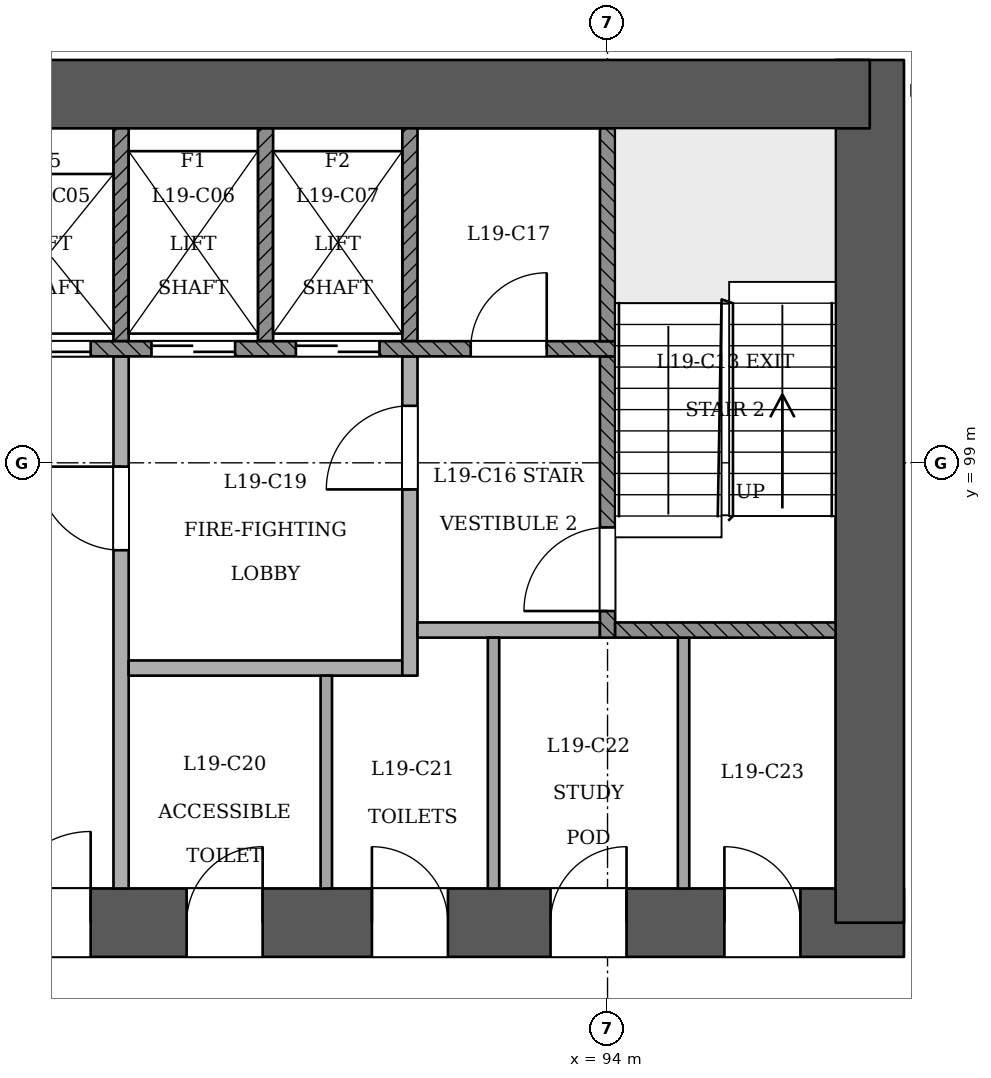
"""IFC4 building model, lengths in metres.
Left out: names, types, materials, properties, quantities, classifications, styles, units other than length and angle.
Written with IfcOpenShell. Run it as: python <this file> out.ifc"""

import sys

from ifc_helpers import new_model, si_unit, direction, frame, frame_2d, origin, place, context, subcontext, project, spatial, rectangle, extrude, element, fill, save


model = new_model("IFC4")
c1 = context("Model", 3, precision=1e-05, world=origin(), true_north=direction((0.0, 1.0)))
c2 = subcontext(c1, "Body", "Model", "MODEL_VIEW")
j1 = project(units=[si_unit("LENGTHUNIT", "METRE"), si_unit("PLANEANGLEUNIT", "RADIAN")], contexts=[c1])
p1 = place(None, origin())
s1 = spatial("IfcSite", under=j1, at=p1, CompositionType="ELEMENT")
p2 = place(p1, origin())
s2 = spatial("IfcBuilding", under=s1, at=p2, CompositionType="ELEMENT")
p3 = place(p2, frame((0.0, 0.0, 77.4)))
s3 = spatial("IfcBuildingStorey", under=s2, at=p3, CompositionType="ELEMENT", Elevation=77.4)
p4 = place(p3, frame((72.55, 92.95, 0.0), z_axis=(0.0, 0.0, 1.0), x_axis=(1.0, 0.0, 0.0)))
e1 = element("IfcWall", 1, at=p4, inside=s3, PredefinedType="SHEAR", context=c2, shape_type="SweptSolid", body=[
    extrude(rectangle(XDim=25.35, YDim=0.9, at=frame_2d((12.675, 0.0))), origin(), (0.0, 0.0, 1.0), 3.6),
])
p5 = place(p4, frame((1.25, 0.0, 0.0)))
e2 = element("IfcOpeningElement", 2, at=p5, cuts=e1, PredefinedType="OPENING", context=c2, shape_type="SweptSolid", body=[
    extrude(rectangle(XDim=1.2, YDim=2.1, at=frame_2d((0.6, 1.05))), frame((0.0, 0.46, 0.0), z_axis=(0.0, -1.0, 0.0), x_axis=(1.0, 0.0, 0.0)), (0.0, 0.0, 1.0), 0.921),
])
p6 = place(p4, frame((3.45, 0.0, 0.0)))
e3 = element("IfcOpeningElement", 3, at=p6, cuts=e1, PredefinedType="OPENING", context=c2, shape_type="SweptSolid", body=[
    extrude(rectangle(XDim=1.2, YDim=2.1, at=frame_2d((0.6, 1.05))), frame((0.0, 0.46, 0.0), z_axis=(0.0, -1.0, 0.0), x_axis=(1.0, 0.0, 0.0)), (0.0, 0.0, 1.0), 0.921),
])
p7 = place(p4, frame((13.45, 0.0, 0.0)))
e4 = element("IfcOpeningElement", 4, at=p7, cuts=e1, PredefinedType="OPENING", context=c2, shape_type="SweptSolid", body=[
    extrude(rectangle(XDim=1.2, YDim=2.1, at=frame_2d((0.6, 1.05))), frame((0.0, 0.46, 0.0), z_axis=(0.0, -1.0, 0.0), x_axis=(1.0, 0.0, 0.0)), (0.0, 0.0, 1.0), 0.921),
])
p8 = place(p4, frame((15.913, 0.0, 0.0)))
e5 = element("IfcOpeningElement", 5, at=p8, cuts=e1, PredefinedType="OPENING", context=c2, shape_type="SweptSolid", body=[
    extrude(rectangle(XDim=1.0, YDim=2.1, at=frame_2d((0.5, 1.05))), frame((0.0, 0.46, 0.0), z_axis=(0.0, -1.0, 0.0), x_axis=(1.0, 0.0, 0.0)), (0.0, 0.0, 1.0), 0.921),
])
p9 = place(p4, frame((18.35, 0.0, 0.0)))
e6 = element("IfcOpeningElement", 6, at=p9, cuts=e1, PredefinedType="OPENING", context=c2, shape_type="SweptSolid", body=[
    extrude(rectangle(XDim=1.0, YDim=2.1, at=frame_2d((0.5, 1.05))), frame((0.0, 0.46, 0.0), z_axis=(0.0, -1.0, 0.0), x_axis=(1.0, 0.0, 0.0)), (0.0, 0.0, 1.0), 0.921),
])
p10 = place(p4, frame((20.7, 0.0, 0.0)))
e7 = element("IfcOpeningElement", 7, at=p10, cuts=e1, PredefinedType="OPENING", context=c2, shape_type="SweptSolid", body=[
    extrude(rectangle(XDim=1.0, YDim=2.1, at=frame_2d((0.5, 1.05))), frame((0.0, 0.46, 0.0), z_axis=(0.0, -1.0, 0.0), x_axis=(1.0, 0.0, 0.0)), (0.0, 0.0, 1.0), 0.921),
])
p11 = place(p4, frame((22.988, 0.0, 0.0)))
e8 = element("IfcOpeningElement", 8, at=p11, cuts=e1, PredefinedType="OPENING", context=c2, shape_type="SweptSolid", body=[
    extrude(rectangle(XDim=1.0, YDim=2.1, at=frame_2d((0.5, 1.05))), frame((0.0, 0.46, 0.0), z_axis=(0.0, -1.0, 0.0), x_axis=(1.0, 0.0, 0.0)), (0.0, 0.0, 1.0), 0.921),
])
p12 = place(p3, frame((97.45, 92.95, 0.0), z_axis=(0.0, 0.0, 1.0), x_axis=(0.0, 1.0, 0.0)))
e9 = element("IfcWall", 9, at=p12, inside=s3, PredefinedType="SHEAR", context=c2, shape_type="SweptSolid", body=[
    extrude(rectangle(XDim=11.35, YDim=0.9, at=frame_2d((5.675, 0.0))), origin(), (0.0, 0.0, 1.0), 3.6),
])
p13 = place(p3, frame((97.45, 103.85, 0.0), z_axis=(0.0, 0.0, 1.0), x_axis=(-1.0, 0.0, 0.0)))
e10 = element("IfcWall", 10, at=p13, inside=s3, PredefinedType="SHEAR", context=c2, shape_type="SweptSolid", body=[
    extrude(rectangle(XDim=25.35, YDim=0.9, at=frame_2d((12.675, 0.0))), origin(), (0.0, 0.0, 1.0), 3.6),
])
p14 = place(p3, frame((85.708, 60.106, 0.0), z_axis=(0.0, 0.0, 1.0), x_axis=(0.500000789788, 0.8660249478, 0.0)))
e11 = element("IfcWall", 11, at=p14, inside=s3, PredefinedType="PARTITIONING", context=c2, shape_type="SweptSolid", body=[
    extrude(rectangle(XDim=42.368, YDim=0.15, at=frame_2d((21.184, 0.0))), origin(), (0.0, 0.0, 1.0), 2.7),
])
p15 = place(p14, frame((0.233, 0.0, 0.0)))
e12 = element("IfcOpeningElement", 12, at=p15, cuts=e11, PredefinedType="OPENING", context=c2, shape_type="SweptSolid", body=[
    extrude(rectangle(XDim=1.2, YDim=2.1, at=frame_2d((0.6, 1.05))), frame((0.0, 0.085, 0.0), z_axis=(0.0, -1.0, 0.0), x_axis=(1.0, 0.0, 0.0)), (0.0, 0.0, 1.0), 0.171),
])
p16 = place(p14, frame((4.063, 0.0, 0.0)))
e13 = element("IfcOpeningElement", 13, at=p16, cuts=e11, PredefinedType="OPENING", context=c2, shape_type="SweptSolid", body=[
    extrude(rectangle(XDim=1.0, YDim=2.1, at=frame_2d((0.5, 1.05))), frame((0.0, 0.085, 0.0), z_axis=(0.0, -1.0, 0.0), x_axis=(1.0, 0.0, 0.0)), (0.0, 0.0, 1.0), 0.171),
])
p17 = place(p14, frame((10.738, 0.0, 0.0)))
e14 = element("IfcOpeningElement", 14, at=p17, cuts=e11, PredefinedType="OPENING", context=c2, shape_type="SweptSolid", body=[
    extrude(rectangle(XDim=1.0, YDim=2.1, at=frame_2d((0.5, 1.05))), frame((0.0, 0.085, 0.0), z_axis=(0.0, -1.0, 0.0), x_axis=(1.0, 0.0, 0.0)), (0.0, 0.0, 1.0), 0.171),
])
p18 = place(p14, frame((13.179, 0.0, 0.0)))
e15 = element("IfcOpeningElement", 15, at=p18, cuts=e11, PredefinedType="OPENING", context=c2, shape_type="SweptSolid", body=[
    extrude(rectangle(XDim=1.0, YDim=2.1, at=frame_2d((0.5, 1.05))), frame((0.0, 0.085, 0.0), z_axis=(0.0, -1.0, 0.0), x_axis=(1.0, 0.0, 0.0)), (0.0, 0.0, 1.0), 0.171),
])
p19 = place(p14, frame((20.858, 0.0, 0.0)))
e16 = element("IfcOpeningElement", 16, at=p19, cuts=e11, PredefinedType="OPENING", context=c2, shape_type="SweptSolid", body=[
    extrude(rectangle(XDim=1.2, YDim=2.1, at=frame_2d((0.6, 1.05))), frame((0.0, 0.085, 0.0), z_axis=(0.0, -1.0, 0.0), x_axis=(1.0, 0.0, 0.0)), (0.0, 0.0, 1.0), 0.171),
])
p20 = place(p14, frame((28.738, 0.0, 0.0)))
e17 = element("IfcOpeningElement", 17, at=p20, cuts=e11, PredefinedType="OPENING", context=c2, shape_type="SweptSolid", body=[
    extrude(rectangle(XDim=1.0, YDim=2.1, at=frame_2d((0.5, 1.05))), frame((0.0, 0.085, 0.0), z_axis=(0.0, -1.0, 0.0), x_axis=(1.0, 0.0, 0.0)), (0.0, 0.0, 1.0), 0.171),
])
p21 = place(p14, frame((31.029, 0.0, 0.0)))
e18 = element("IfcOpeningElement", 18, at=p21, cuts=e11, PredefinedType="OPENING", context=c2, shape_type="SweptSolid", body=[
    extrude(rectangle(XDim=1.1, YDim=2.1, at=frame_2d((0.55, 1.05))), frame((0.0, 0.085, 0.0), z_axis=(0.0, -1.0, 0.0), x_axis=(1.0, 0.0, 0.0)), (0.0, 0.0, 1.0), 0.171),
])
p22 = place(p14, frame((38.401, 0.0, 0.0)))
e19 = element("IfcOpeningElement", 19, at=p22, cuts=e11, PredefinedType="OPENING", context=c2, shape_type="SweptSolid", body=[
    extrude(rectangle(XDim=1.2, YDim=2.1, at=frame_2d((0.6, 1.05))), frame((0.0, 0.085, 0.0), z_axis=(0.0, -1.0, 0.0), x_axis=(1.0, 0.0, 0.0)), (0.0, 0.0, 1.0), 0.171),
])
p23 = place(p3, frame((87.6, 93.4, 0.0), z_axis=(0.0, 0.0, 1.0), x_axis=(0.0, 1.0, 0.0)))
e20 = element("IfcWall", 20, at=p23, inside=s3, PredefinedType="PARTITIONING", context=c2, shape_type="SweptSolid", body=[
    extrude(rectangle(XDim=7.0, YDim=0.2, at=frame_2d((3.5, 0.0))), origin(), (0.0, 0.0, 1.0), 3.1),
])
p24 = place(p23, frame((4.45, 0.0, 0.0)))
e21 = element("IfcOpeningElement", 21, at=p24, cuts=e20, PredefinedType="OPENING", context=c2, shape_type="SweptSolid", body=[
    extrude(rectangle(XDim=1.1, YDim=2.1, at=frame_2d((0.55, 1.05))), frame((0.0, 0.11, 0.0), z_axis=(0.0, -1.0, 0.0), x_axis=(1.0, 0.0, 0.0)), (0.0, 0.0, 1.0), 0.221),
])
p25 = place(p3, frame((90.3, 93.4, 0.0), z_axis=(0.0, 0.0, 1.0), x_axis=(0.0, 1.0, 0.0)))
e22 = element("IfcWall", 22, at=p25, inside=s3, PredefinedType="PARTITIONING", context=c2, shape_type="SweptSolid", body=[
    extrude(rectangle(XDim=2.8, YDim=0.15, at=frame_2d((1.4, 0.0))), origin(), (0.0, 0.0, 1.0), 3.1),
])
for number, where, z_axis, x_axis in (
    (23, (92.5, 93.4, 0.0), (0.0, 0.0, 1.0), (0.0, 1.0, 0.0)),
    (24, (95.0, 93.4, 0.0), (0.0, 0.0, 1.0), (0.0, 1.0, 0.0)),
):
    element("IfcWall", number, at=place(p3, frame(where, z_axis=z_axis, x_axis=x_axis)), inside=s3, PredefinedType="PARTITIONING", context=c2, shape_type="SweptSolid", body=[
        extrude(rectangle(XDim=3.3, YDim=0.15, at=frame_2d((1.65, 0.0))), origin(), (0.0, 0.0, 1.0), 3.1),
    ])
p26 = place(p3, frame((87.7, 96.3, 0.0), z_axis=(0.0, 0.0, 1.0), x_axis=(1.0, 0.0, 0.0)))
e25 = element("IfcWall", 25, at=p26, inside=s3, PredefinedType="PARTITIONING", context=c2, shape_type="SweptSolid", body=[
    extrude(rectangle(XDim=3.6, YDim=0.2, at=frame_2d((1.8, 0.0))), origin(), (0.0, 0.0, 1.0), 3.1),
])
p27 = place(p3, frame((91.4, 96.2, 0.0), z_axis=(0.0, 0.0, 1.0), x_axis=(0.0, 1.0, 0.0)))
e26 = element("IfcWall", 26, at=p27, inside=s3, PredefinedType="PARTITIONING", context=c2, shape_type="SweptSolid", body=[
    extrude(rectangle(XDim=4.2, YDim=0.2, at=frame_2d((2.1, 0.0))), origin(), (0.0, 0.0, 1.0), 3.1),
])
p28 = place(p27, frame((2.45, 0.0, 0.0)))
e27 = element("IfcOpeningElement", 27, at=p28, cuts=e26, PredefinedType="OPENING", context=c2, shape_type="SweptSolid", body=[
    extrude(rectangle(XDim=1.1, YDim=2.1, at=frame_2d((0.55, 1.05))), frame((0.0, 0.11, 0.0), z_axis=(0.0, -1.0, 0.0), x_axis=(1.0, 0.0, 0.0)), (0.0, 0.0, 1.0), 0.221),
])
p29 = place(p3, frame((91.5, 96.8, 0.0), z_axis=(0.0, 0.0, 1.0), x_axis=(1.0, 0.0, 0.0)))
e28 = element("IfcWall", 28, at=p29, inside=s3, PredefinedType="PARTITIONING", context=c2, shape_type="SweptSolid", body=[
    extrude(rectangle(XDim=2.4, YDim=0.2, at=frame_2d((1.2, 0.0))), origin(), (0.0, 0.0, 1.0), 3.1),
])
p30 = place(p3, frame((94.0, 96.7, 0.0), z_axis=(0.0, 0.0, 1.0), x_axis=(0.0, 1.0, 0.0)))
e29 = element("IfcWall", 29, at=p30, inside=s3, PredefinedType="SOLIDWALL", context=c2, shape_type="SweptSolid", body=[
    extrude(rectangle(XDim=3.7, YDim=0.2, at=frame_2d((1.85, 0.0))), origin(), (0.0, 0.0, 1.0), 3.1),
])
p31 = place(p30, frame((0.35, 0.0, 0.0)))
e30 = element("IfcOpeningElement", 30, at=p31, cuts=e29, PredefinedType="OPENING", context=c2, shape_type="SweptSolid", body=[
    extrude(rectangle(XDim=1.1, YDim=2.1, at=frame_2d((0.55, 1.05))), frame((0.0, 0.11, 0.0), z_axis=(0.0, -1.0, 0.0), x_axis=(1.0, 0.0, 0.0)), (0.0, 0.0, 1.0), 0.221),
])
p32 = place(p3, frame((94.1, 96.8, 0.0), z_axis=(0.0, 0.0, 1.0), x_axis=(1.0, 0.0, 0.0)))
e31 = element("IfcWall", 31, at=p32, inside=s3, PredefinedType="SOLIDWALL", context=c2, shape_type="SweptSolid", body=[
    extrude(rectangle(XDim=2.9, YDim=0.2, at=frame_2d((1.45, 0.0))), origin(), (0.0, 0.0, 1.0), 3.1),
])
p33 = place(p3, frame((75.9, 100.5, 0.0), z_axis=(0.0, 0.0, 1.0), x_axis=(1.0, 0.0, 0.0)))
e32 = element("IfcWall", 32, at=p33, inside=s3, PredefinedType="SOLIDWALL", context=c2, shape_type="SweptSolid", body=[
    extrude(rectangle(XDim=18.2, YDim=0.2, at=frame_2d((9.1, 0.0))), origin(), (0.0, 0.0, 1.0), 3.1),
])
p34 = place(p33, frame((2.6, 0.0, 0.0)))
e33 = element("IfcOpeningElement", 33, at=p34, cuts=e32, PredefinedType="OPENING", context=c2, shape_type="SweptSolid", body=[
    extrude(rectangle(XDim=1.1, YDim=2.1, at=frame_2d((0.55, 1.05))), frame((0.0, 0.11, 0.0), z_axis=(0.0, -1.0, 0.0), x_axis=(1.0, 0.0, 0.0)), (0.0, 0.0, 1.0), 0.221),
])
p35 = place(p33, frame((4.5, 0.0, 0.0)))
e34 = element("IfcOpeningElement", 34, at=p35, cuts=e32, PredefinedType="OPENING", context=c2, shape_type="SweptSolid", body=[
    extrude(rectangle(XDim=1.1, YDim=2.1, at=frame_2d((0.55, 1.05))), frame((0.0, 0.11, 0.0), z_axis=(0.0, -1.0, 0.0), x_axis=(1.0, 0.0, 0.0)), (0.0, 0.0, 1.0), 0.221),
])
p36 = place(p33, frame((6.4, 0.0, 0.0)))
e35 = element("IfcOpeningElement", 35, at=p36, cuts=e32, PredefinedType="OPENING", context=c2, shape_type="SweptSolid", body=[
    extrude(rectangle(XDim=1.1, YDim=2.1, at=frame_2d((0.55, 1.05))), frame((0.0, 0.11, 0.0), z_axis=(0.0, -1.0, 0.0), x_axis=(1.0, 0.0, 0.0)), (0.0, 0.0, 1.0), 0.221),
])
p37 = place(p33, frame((8.3, 0.0, 0.0)))
e36 = element("IfcOpeningElement", 36, at=p37, cuts=e32, PredefinedType="OPENING", context=c2, shape_type="SweptSolid", body=[
    extrude(rectangle(XDim=1.1, YDim=2.1, at=frame_2d((0.55, 1.05))), frame((0.0, 0.11, 0.0), z_axis=(0.0, -1.0, 0.0), x_axis=(1.0, 0.0, 0.0)), (0.0, 0.0, 1.0), 0.221),
])
p38 = place(p33, frame((10.2, 0.0, 0.0)))
e37 = element("IfcOpeningElement", 37, at=p38, cuts=e32, PredefinedType="OPENING", context=c2, shape_type="SweptSolid", body=[
    extrude(rectangle(XDim=1.1, YDim=2.1, at=frame_2d((0.55, 1.05))), frame((0.0, 0.11, 0.0), z_axis=(0.0, -1.0, 0.0), x_axis=(1.0, 0.0, 0.0)), (0.0, 0.0, 1.0), 0.221),
])
p39 = place(p33, frame((12.1, 0.0, 0.0)))
e38 = element("IfcOpeningElement", 38, at=p39, cuts=e32, PredefinedType="OPENING", context=c2, shape_type="SweptSolid", body=[
    extrude(rectangle(XDim=1.1, YDim=2.1, at=frame_2d((0.55, 1.05))), frame((0.0, 0.11, 0.0), z_axis=(0.0, -1.0, 0.0), x_axis=(1.0, 0.0, 0.0)), (0.0, 0.0, 1.0), 0.221),
])
p40 = place(p33, frame((14.0, 0.0, 0.0)))
e39 = element("IfcOpeningElement", 39, at=p40, cuts=e32, PredefinedType="OPENING", context=c2, shape_type="SweptSolid", body=[
    extrude(rectangle(XDim=1.1, YDim=2.1, at=frame_2d((0.55, 1.05))), frame((0.0, 0.11, 0.0), z_axis=(0.0, -1.0, 0.0), x_axis=(1.0, 0.0, 0.0)), (0.0, 0.0, 1.0), 0.221),
])
p41 = place(p33, frame((0.65, 0.0, 0.0)))
e40 = element("IfcOpeningElement", 40, at=p41, cuts=e32, PredefinedType="OPENING", context=c2, shape_type="SweptSolid", body=[
    extrude(rectangle(XDim=1.0, YDim=2.1, at=frame_2d((0.5, 1.05))), frame((0.0, 0.11, 0.0), z_axis=(0.0, -1.0, 0.0), x_axis=(1.0, 0.0, 0.0)), (0.0, 0.0, 1.0), 0.221),
])
p42 = place(p33, frame((16.3, 0.0, 0.0)))
e41 = element("IfcOpeningElement", 41, at=p42, cuts=e32, PredefinedType="OPENING", context=c2, shape_type="SweptSolid", body=[
    extrude(rectangle(XDim=1.0, YDim=2.1, at=frame_2d((0.5, 1.05))), frame((0.0, 0.11, 0.0), z_axis=(0.0, -1.0, 0.0), x_axis=(1.0, 0.0, 0.0)), (0.0, 0.0, 1.0), 0.221),
])
for number, where, z_axis, x_axis in (
    (42, (87.6, 100.6, 0.0), (0.0, 0.0, 1.0), (0.0, 1.0, 0.0)),
    (43, (89.5, 100.6, 0.0), (0.0, 0.0, 1.0), (0.0, 1.0, 0.0)),
    (44, (91.4, 100.6, 0.0), (0.0, 0.0, 1.0), (0.0, 1.0, 0.0)),
    (45, (94.0, 100.6, 0.0), (0.0, 0.0, 1.0), (0.0, 1.0, 0.0)),
):
    element("IfcWall", number, at=place(p3, frame(where, z_axis=z_axis, x_axis=x_axis)), inside=s3, PredefinedType="SOLIDWALL", context=c2, shape_type="SweptSolid", body=[
        extrude(rectangle(XDim=2.8, YDim=0.2, at=frame_2d((1.4, 0.0))), origin(), (0.0, 0.0, 1.0), 3.1),
    ])
p43 = place(p38, origin())
e46 = element("IfcDoor", 46, at=p43, inside=s3, OperationType="SLIDING_TO_RIGHT", PredefinedType="NOTDEFINED", context=c2, shape_type="SweptSolid", body=[
    extrude(rectangle(XDim=1.1, YDim=2.1, at=frame_2d((0.55, 1.05))), frame((0.0, 0.025, 0.0), z_axis=(0.0, -1.0, 0.0), x_axis=(1.0, 0.0, 0.0)), (0.0, 0.0, 1.0), 0.05),
])
fill(e37, e46)
p44 = place(p39, origin())
e47 = element("IfcDoor", 47, at=p44, inside=s3, OperationType="SLIDING_TO_RIGHT", PredefinedType="NOTDEFINED", context=c2, shape_type="SweptSolid", body=[
    extrude(rectangle(XDim=1.1, YDim=2.1, at=frame_2d((0.55, 1.05))), frame((0.0, 0.025, 0.0), z_axis=(0.0, -1.0, 0.0), x_axis=(1.0, 0.0, 0.0)), (0.0, 0.0, 1.0), 0.05),
])
fill(e38, e47)
p45 = place(p40, origin())
e48 = element("IfcDoor", 48, at=p45, inside=s3, OperationType="SLIDING_TO_LEFT", PredefinedType="NOTDEFINED", context=c2, shape_type="SweptSolid", body=[
    extrude(rectangle(XDim=1.1, YDim=2.1, at=frame_2d((0.55, 1.05))), frame((0.0, 0.025, 0.0), z_axis=(0.0, -1.0, 0.0), x_axis=(1.0, 0.0, 0.0)), (0.0, 0.0, 1.0), 0.05),
])
fill(e39, e48)
p46 = place(p31, origin())
e49 = element("IfcDoor", 49, at=p46, inside=s3, OperationType="SINGLE_SWING_LEFT", PredefinedType="NOTDEFINED", context=c2, shape_type="SweptSolid", body=[
    extrude(rectangle(XDim=1.1, YDim=2.1, at=frame_2d((0.55, 1.05))), frame((0.0, 0.025, 0.0), z_axis=(0.0, -1.0, 0.0), x_axis=(1.0, 0.0, 0.0)), (0.0, 0.0, 1.0), 0.05),
])
fill(e30, e49)
p47 = place(p24, origin())
e50 = element("IfcDoor", 50, at=p47, inside=s3, OperationType="SINGLE_SWING_RIGHT", PredefinedType="NOTDEFINED", context=c2, shape_type="SweptSolid", body=[
    extrude(rectangle(XDim=1.1, YDim=2.1, at=frame_2d((0.55, 1.05))), frame((0.0, 0.025, 0.0), z_axis=(0.0, -1.0, 0.0), x_axis=(1.0, 0.0, 0.0)), (0.0, 0.0, 1.0), 0.05),
])
fill(e21, e50)
p48 = place(p28, origin())
e51 = element("IfcDoor", 51, at=p48, inside=s3, OperationType="SINGLE_SWING_LEFT", PredefinedType="NOTDEFINED", context=c2, shape_type="SweptSolid", body=[
    extrude(rectangle(XDim=1.1, YDim=2.1, at=frame_2d((0.55, 1.05))), frame((0.0, 0.025, 0.0), z_axis=(0.0, -1.0, 0.0), x_axis=(1.0, 0.0, 0.0)), (0.0, 0.0, 1.0), 0.05),
])
fill(e27, e51)
p49 = place(p7, origin())
e52 = element("IfcDoor", 52, at=p49, inside=s3, OperationType="SINGLE_SWING_RIGHT", PredefinedType="NOTDEFINED", context=c2, shape_type="SweptSolid", body=[
    extrude(rectangle(XDim=1.2, YDim=2.1, at=frame_2d((0.6, 1.05))), frame((0.0, 0.025, 0.0), z_axis=(0.0, -1.0, 0.0), x_axis=(1.0, 0.0, 0.0)), (0.0, 0.0, 1.0), 0.05),
])
fill(e4, e52)
p50 = place(p42, origin())
e53 = element("IfcDoor", 53, at=p50, inside=s3, OperationType="SINGLE_SWING_RIGHT", PredefinedType="NOTDEFINED", context=c2, shape_type="SweptSolid", body=[
    extrude(rectangle(XDim=1.0, YDim=2.1, at=frame_2d((0.5, 1.05))), frame((0.0, 0.025, 0.0), z_axis=(0.0, -1.0, 0.0), x_axis=(1.0, 0.0, 0.0)), (0.0, 0.0, 1.0), 0.05),
])
fill(e41, e53)
p51 = place(p8, origin())
e54 = element("IfcDoor", 54, at=p51, inside=s3, OperationType="SINGLE_SWING_RIGHT", PredefinedType="NOTDEFINED", context=c2, shape_type="SweptSolid", body=[
    extrude(rectangle(XDim=1.0, YDim=2.1, at=frame_2d((0.5, 1.05))), frame((0.0, 0.025, 0.0), z_axis=(0.0, -1.0, 0.0), x_axis=(1.0, 0.0, 0.0)), (0.0, 0.0, 1.0), 0.05),
])
fill(e5, e54)
p52 = place(p9, origin())
e55 = element("IfcDoor", 55, at=p52, inside=s3, OperationType="SINGLE_SWING_LEFT", PredefinedType="NOTDEFINED", context=c2, shape_type="SweptSolid", body=[
    extrude(rectangle(XDim=1.0, YDim=2.1, at=frame_2d((0.5, 1.05))), frame((0.0, 0.025, 0.0), z_axis=(0.0, -1.0, 0.0), x_axis=(1.0, 0.0, 0.0)), (0.0, 0.0, 1.0), 0.05),
])
fill(e6, e55)
p53 = place(p10, origin())
e56 = element("IfcDoor", 56, at=p53, inside=s3, OperationType="SINGLE_SWING_RIGHT", PredefinedType="NOTDEFINED", context=c2, shape_type="SweptSolid", body=[
    extrude(rectangle(XDim=1.0, YDim=2.1, at=frame_2d((0.5, 1.05))), frame((0.0, 0.025, 0.0), z_axis=(0.0, -1.0, 0.0), x_axis=(1.0, 0.0, 0.0)), (0.0, 0.0, 1.0), 0.05),
])
fill(e7, e56)
p54 = place(p11, origin())
e57 = element("IfcDoor", 57, at=p54, inside=s3, OperationType="SINGLE_SWING_LEFT", PredefinedType="NOTDEFINED", context=c2, shape_type="SweptSolid", body=[
    extrude(rectangle(XDim=1.0, YDim=2.1, at=frame_2d((0.5, 1.05))), frame((0.0, 0.025, 0.0), z_axis=(0.0, -1.0, 0.0), x_axis=(1.0, 0.0, 0.0)), (0.0, 0.0, 1.0), 0.05),
])
fill(e8, e57)
save(model, sys.argv[1])
